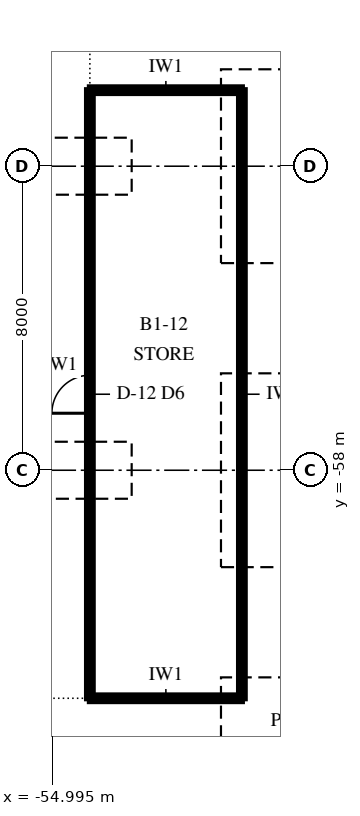
"""IFC4 building model, lengths in metres.
Left out: names, types, materials, properties, quantities, classifications, styles, units other than length and angle.
Written with IfcOpenShell. Run it as: python <this file> out.ifc"""

import sys

from ifc_helpers import new_model, si_unit, direction, frame, frame_2d, origin, place, context, subcontext, project, spatial, rectangle, extrude, element, fill, save


model = new_model("IFC4")
c1 = context("Model", 3, precision=1e-05, world=origin(), true_north=direction((0.0, 1.0)))
c2 = subcontext(c1, "Body", "Model", "MODEL_VIEW")
j1 = project(units=[si_unit("LENGTHUNIT", "METRE"), si_unit("PLANEANGLEUNIT", "RADIAN")], contexts=[c1])
p1 = place(None, origin())
s1 = spatial("IfcSite", under=j1, at=p1, CompositionType="ELEMENT")
p2 = place(p1, origin())
s2 = spatial("IfcBuilding", under=s1, at=p2, CompositionType="ELEMENT")
p3 = place(p2, frame((0.0, 0.0, -7.0)))
s3 = spatial("IfcBuildingStorey", under=s2, at=p3, CompositionType="ELEMENT", Elevation=-7.0)
p4 = place(p3, frame((-54.0, -64.0, 0.0), z_axis=(0.0, 0.0, 1.0), x_axis=(0.0, 1.0, 0.0)))
e1 = element("IfcWall", 1, at=p4, inside=s3, PredefinedType="PARTITIONING", context=c2, shape_type="SweptSolid", body=[
    extrude(rectangle(XDim=16.0, YDim=0.15, at=frame_2d((8.0, 0.0))), origin(), (0.0, 0.0, 1.0), 6.7),
])
p5 = place(p4, frame((7.5, 0.0, 0.0)))
e2 = element("IfcOpeningElement", 2, at=p5, cuts=e1, PredefinedType="OPENING", context=c2, shape_type="SweptSolid", body=[
    extrude(rectangle(XDim=1.0, YDim=2.1, at=frame_2d((0.5, 1.05))), frame((0.0, 0.09, 0.0), z_axis=(0.0, -1.0, 0.0), x_axis=(1.0, 0.0, 0.0)), (0.0, 0.0, 1.0), 0.18),
])
p6 = place(p3, frame((-50.0, -64.0, 0.0), z_axis=(0.0, 0.0, 1.0), x_axis=(0.0, 1.0, 0.0)))
e3 = element("IfcWall", 3, at=p6, inside=s3, PredefinedType="PARTITIONING", context=c2, shape_type="SweptSolid", body=[
    extrude(rectangle(XDim=16.0, YDim=0.15, at=frame_2d((8.0, 0.0))), origin(), (0.0, 0.0, 1.0), 6.7),
])
for number, where, z_axis, x_axis in (
    (4, (-54.0, -64.0, 0.0), (0.0, 0.0, 1.0), (1.0, 0.0, 0.0)),
    (5, (-54.0, -48.0, 0.0), (0.0, 0.0, 1.0), (1.0, 0.0, 0.0)),
):
    element("IfcWall", number, at=place(p3, frame(where, z_axis=z_axis, x_axis=x_axis)), inside=s3, PredefinedType="PARTITIONING", context=c2, shape_type="SweptSolid", body=[
        extrude(rectangle(XDim=4.0, YDim=0.15, at=frame_2d((2.0, 0.0))), origin(), (0.0, 0.0, 1.0), 6.7),
    ])
p7 = place(p5, origin())
e6 = element("IfcDoor", 6, at=p7, inside=s3, OperationType="SINGLE_SWING_LEFT", PredefinedType="DOOR", context=c2, shape_type="SweptSolid", body=[
    extrude(rectangle(XDim=1.0, YDim=2.1, at=frame_2d((0.5, 1.05))), frame((0.0, 0.075, 0.0), z_axis=(0.0, -1.0, 0.0), x_axis=(1.0, 0.0, 0.0)), (0.0, 0.0, 1.0), 0.149),
])
fill(e2, e6)
save(model, sys.argv[1])
